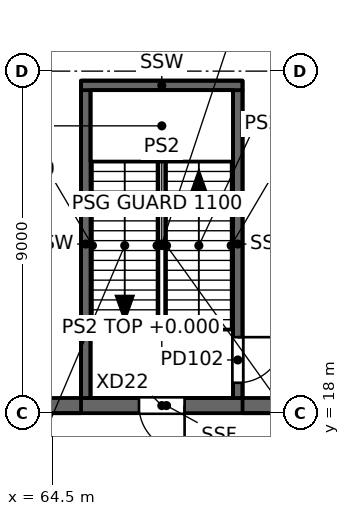
"""IFC4 building model, lengths in metres.
Left out: names, types, materials, properties, quantities, classifications, styles, units other than length and angle.
Written with IfcOpenShell. Run it as: python <this file> out.ifc"""

import sys

from ifc_helpers import new_model, si_unit, direction, frame, frame_2d, origin, place, context, subcontext, project, spatial, rectangle, extrude, element, fill, save


model = new_model("IFC4")
c1 = context("Model", 3, precision=1e-05, world=origin(), true_north=direction((0.0, 1.0)))
c2 = subcontext(c1, "Body", "Model", "MODEL_VIEW")
j1 = project(units=[si_unit("LENGTHUNIT", "METRE"), si_unit("PLANEANGLEUNIT", "RADIAN")], contexts=[c1])
p1 = place(None, origin())
s1 = spatial("IfcSite", under=j1, at=p1, CompositionType="ELEMENT")
p2 = place(p1, origin())
s2 = spatial("IfcBuilding", under=s1, at=p2, CompositionType="ELEMENT")
p3 = place(p2, origin())
s3 = spatial("IfcBuildingStorey", under=s2, at=p3, CompositionType="ELEMENT", Elevation=0.0)
p4 = place(p3, frame((65.375, 18.4, 0.0), z_axis=(0.0, 0.0, 1.0), x_axis=(0.0, 1.0, 0.0)))
e1 = element("IfcWall", 1, at=p4, inside=s3, PredefinedType="SOLIDWALL", context=c2, shape_type="SweptSolid", body=[
    extrude(rectangle(XDim=8.1, YDim=0.25, at=frame_2d((4.05, 0.0))), origin(), (0.0, 0.0, 1.0), 6.0),
])
p5 = place(p3, frame((69.375, 26.5, 0.0), z_axis=(0.0, 0.0, 1.0), x_axis=(0.0, -1.0, 0.0)))
e2 = element("IfcWall", 2, at=p5, inside=s3, PredefinedType="SOLIDWALL", context=c2, shape_type="SweptSolid", body=[
    extrude(rectangle(XDim=8.1, YDim=0.25, at=frame_2d((4.05, 0.0))), origin(), (0.0, 0.0, 1.0), 6.0),
])
p6 = place(p5, frame((6.5, 0.0, 0.0)))
e3 = element("IfcOpeningElement", 3, at=p6, cuts=e2, PredefinedType="OPENING", context=c2, shape_type="SweptSolid", body=[
    extrude(rectangle(XDim=1.2, YDim=2.1, at=frame_2d((0.6, 1.05))), frame((0.0, 0.125, 0.0), z_axis=(0.0, -1.0, 0.0), x_axis=(1.0, 0.0, 0.0)), (0.0, 0.0, 1.0), 0.25),
])
p7 = place(p3, frame((65.25, 26.625, 0.0), z_axis=(0.0, 0.0, 1.0), x_axis=(1.0, 0.0, 0.0)))
e4 = element("IfcWall", 4, at=p7, inside=s3, PredefinedType="SOLIDWALL", context=c2, shape_type="SweptSolid", body=[
    extrude(rectangle(XDim=4.25, YDim=0.25, at=frame_2d((2.125, 0.0))), origin(), (0.0, 0.0, 1.0), 6.0),
])
p8 = place(p3, frame((71.25, 18.2, 0.0), z_axis=(0.0, 0.0, 1.0), x_axis=(-1.0, 0.0, 0.0)))
e5 = element("IfcWall", 5, at=p8, inside=s3, PredefinedType="SOLIDWALL", context=c2, shape_type="SweptSolid", body=[
    extrude(rectangle(XDim=7.5, YDim=0.4, at=frame_2d((3.75, 0.0))), origin(), (0.0, 0.0, 1.0), 5.65),
])
p9 = place(p8, frame((3.275, 0.0, 0.0)))
e6 = element("IfcOpeningElement", 6, at=p9, cuts=e5, PredefinedType="OPENING", context=c2, shape_type="SweptSolid", body=[
    extrude(rectangle(XDim=1.2, YDim=2.1, at=frame_2d((0.6, 1.05))), frame((0.0, 0.2, 0.0), z_axis=(0.0, -1.0, 0.0), x_axis=(1.0, 0.0, 0.0)), (0.0, 0.0, 1.0), 0.4),
])
p10 = place(p6, origin())
e7 = element("IfcDoor", 7, at=p10, inside=s3, OperationType="SINGLE_SWING_LEFT", PredefinedType="DOOR", context=c2, shape_type="SweptSolid", body=[
    extrude(rectangle(XDim=1.2, YDim=2.1, at=frame_2d((0.6, 1.05))), frame((0.0, 0.025, 0.0), z_axis=(0.0, -1.0, 0.0), x_axis=(1.0, 0.0, 0.0)), (0.0, 0.0, 1.0), 0.05),
])
fill(e3, e7)
p11 = place(p9, origin())
e8 = element("IfcDoor", 8, at=p11, inside=s3, OperationType="SINGLE_SWING_LEFT", PredefinedType="DOOR", context=c2, shape_type="SweptSolid", body=[
    extrude(rectangle(XDim=1.2, YDim=2.1, at=frame_2d((0.6, 1.05))), frame((0.0, 0.025, 0.0), z_axis=(0.0, -1.0, 0.0), x_axis=(1.0, 0.0, 0.0)), (0.0, 0.0, 1.0), 0.05),
])
fill(e6, e8)
save(model, sys.argv[1])
